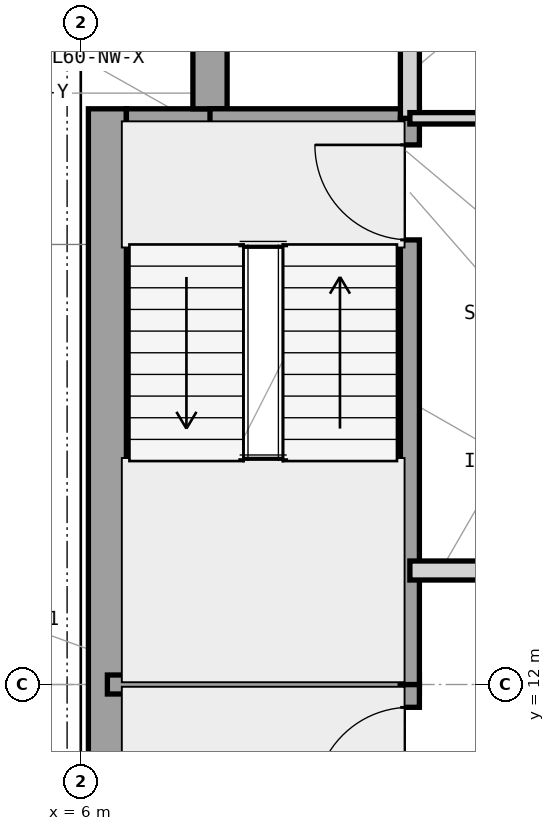
"""IFC4 building model, lengths in metres.
Left out: names, types, materials, properties, quantities, classifications, styles, units other than length and angle.
Written with IfcOpenShell. Run it as: python <this file> out.ifc"""

import sys

from ifc_helpers import new_model, si_unit, direction, frame, frame_2d, origin, place, context, subcontext, project, spatial, rectangle, extrude, element, fill, save


model = new_model("IFC4")
c1 = context("Model", 3, precision=1e-05, world=origin(), true_north=direction((0.0, 1.0)))
c2 = subcontext(c1, "Body", "Model", "MODEL_VIEW")
j1 = project(units=[si_unit("LENGTHUNIT", "METRE"), si_unit("PLANEANGLEUNIT", "RADIAN")], contexts=[c1])
p1 = place(None, origin())
s1 = spatial("IfcSite", under=j1, at=p1, CompositionType="ELEMENT")
p2 = place(p1, origin())
s2 = spatial("IfcBuilding", under=s1, at=p2, CompositionType="ELEMENT")
p3 = place(p2, frame((0.0, 0.0, 246.9)))
s3 = spatial("IfcBuildingStorey", under=s2, at=p3, CompositionType="ELEMENT", Elevation=246.9)
p4 = place(p3, frame((6.35, 4.425, 0.0), z_axis=(0.0, 0.0, 1.0), x_axis=(0.0, 1.0, 0.0)))
e1 = element("IfcWall", 1, at=p4, inside=s3, PredefinedType="SHEAR", context=c2, shape_type="SweptSolid", body=[
    extrude(rectangle(XDim=15.15, YDim=0.5, at=frame_2d((7.575, 0.0))), origin(), (0.0, 0.0, 1.0), 3.9),
])
p5 = place(p3, frame((6.6, 19.35, 0.0), z_axis=(0.0, 0.0, 1.0), x_axis=(1.0, 0.0, 0.0)))
e2 = element("IfcWall", 2, at=p5, inside=s3, PredefinedType="SHEAR", context=c2, shape_type="SweptSolid", body=[
    extrude(rectangle(XDim=1.325, YDim=0.45, at=frame_2d((0.663, 0.0))), origin(), (0.0, 0.0, 1.0), 3.9),
])
p6 = place(p3, frame((7.7, 19.575, 0.0), z_axis=(0.0, 0.0, 1.0), x_axis=(0.0, 1.0, 0.0)))
e3 = element("IfcWall", 3, at=p6, inside=s3, PredefinedType="SHEAR", context=c2, shape_type="SweptSolid", body=[
    extrude(rectangle(XDim=0.825, YDim=0.45, at=frame_2d((0.413, 0.0))), origin(), (0.0, 0.0, 1.0), 3.9),
])
p7 = place(p3, frame((6.35, 12.0, 0.0), z_axis=(0.0, 0.0, 1.0), x_axis=(1.0, 0.0, 0.0)))
e4 = element("IfcWall", 4, at=p7, inside=s3, PredefinedType="SHEAR", context=c2, shape_type="SweptSolid", body=[
    extrude(rectangle(XDim=4.105, YDim=0.25, at=frame_2d((2.052, 0.0))), origin(), (0.0, 0.0, 1.0), 3.9),
])
p8 = place(p3, frame((7.7, 19.45, 0.0), z_axis=(0.0, 0.0, 1.0), x_axis=(1.0, 0.0, 0.0)))
e5 = element("IfcWall", 5, at=p8, inside=s3, PredefinedType="SHEAR", context=c2, shape_type="SweptSolid", body=[
    extrude(rectangle(XDim=2.755, YDim=0.25, at=frame_2d((1.377, 0.0))), origin(), (0.0, 0.0, 1.0), 3.9),
])
p9 = place(p3, frame((10.33, 4.55, 0.0), z_axis=(0.0, 0.0, 1.0), x_axis=(0.0, 1.0, 0.0)))
e6 = element("IfcWall", 6, at=p9, inside=s3, PredefinedType="SHEAR", context=c2, shape_type="SweptSolid", body=[
    extrude(rectangle(XDim=7.45, YDim=0.25, at=frame_2d((3.725, 0.0))), origin(), (0.0, 0.0, 1.0), 3.9),
])
p10 = place(p9, frame((5.9, 0.0, 0.0)))
e7 = element("IfcOpeningElement", 7, at=p10, cuts=e6, PredefinedType="OPENING", context=c2, shape_type="SweptSolid", body=[
    extrude(rectangle(XDim=1.25, YDim=2.2, at=frame_2d((0.625, 1.1))), frame((0.0, 0.135, 0.0), z_axis=(0.0, -1.0, 0.0), x_axis=(1.0, 0.0, 0.0)), (0.0, 0.0, 1.0), 0.27),
])
p11 = place(p3, frame((10.33, 12.0, 0.0), z_axis=(0.0, 0.0, 1.0), x_axis=(0.0, 1.0, 0.0)))
e8 = element("IfcWall", 8, at=p11, inside=s3, PredefinedType="SHEAR", context=c2, shape_type="SweptSolid", body=[
    extrude(rectangle(XDim=7.45, YDim=0.25, at=frame_2d((3.725, 0.0))), origin(), (0.0, 0.0, 1.0), 3.9),
])
p12 = place(p11, frame((5.85, 0.0, 0.0)))
e9 = element("IfcOpeningElement", 9, at=p12, cuts=e8, PredefinedType="OPENING", context=c2, shape_type="SweptSolid", body=[
    extrude(rectangle(XDim=1.25, YDim=2.2, at=frame_2d((0.625, 1.1))), frame((0.0, 0.135, 0.0), z_axis=(0.0, -1.0, 0.0), x_axis=(1.0, 0.0, 0.0)), (0.0, 0.0, 1.0), 0.27),
])
p13 = place(p3, frame((10.33, 19.45, 0.0), z_axis=(0.0, 0.0, 1.0), x_axis=(0.0, 1.0, 0.0)))
e10 = element("IfcWall", 10, at=p13, inside=s3, PredefinedType="PARTITIONING", context=c2, shape_type="SweptSolid", body=[
    extrude(rectangle(XDim=1.2, YDim=0.25, at=frame_2d((0.6, 0.0))), origin(), (0.0, 0.0, 1.0), 3.69),
])
p14 = place(p3, frame((10.33, 13.5, 0.0), z_axis=(0.0, 0.0, 1.0), x_axis=(1.0, 0.0, 0.0)))
e11 = element("IfcWall", 11, at=p14, inside=s3, PredefinedType="PARTITIONING", context=c2, shape_type="SweptSolid", body=[
    extrude(rectangle(XDim=1.62, YDim=0.25, at=frame_2d((0.81, 0.0))), origin(), (0.0, 0.0, 1.0), 3.073),
])
p15 = place(p3, frame((10.33, 19.45, 0.0), z_axis=(0.0, 0.0, 1.0), x_axis=(1.0, 0.0, 0.0)))
e12 = element("IfcWall", 12, at=p15, inside=s3, PredefinedType="PARTITIONING", context=c2, shape_type="SweptSolid", body=[
    extrude(rectangle(XDim=3.82, YDim=0.15, at=frame_2d((1.91, 0.0))), origin(), (0.0, 0.0, 1.0), 3.69),
])
p16 = place(p15, frame((1.25, 0.0, 0.0)))
e13 = element("IfcOpeningElement", 13, at=p16, cuts=e12, PredefinedType="OPENING", context=c2, shape_type="SweptSolid", body=[
    extrude(rectangle(XDim=0.95, YDim=2.1, at=frame_2d((0.475, 1.05))), frame((0.0, 0.085, 0.0), z_axis=(0.0, -1.0, 0.0), x_axis=(1.0, 0.0, 0.0)), (0.0, 0.0, 1.0), 0.17),
])
p17 = place(p10, origin())
e14 = element("IfcDoor", 14, at=p17, inside=s3, OperationType="SINGLE_SWING_LEFT", PredefinedType="DOOR", context=c2, shape_type="SweptSolid", body=[
    extrude(rectangle(XDim=1.25, YDim=2.2, at=frame_2d((0.625, 1.1))), frame((0.0, 0.025, 0.0), z_axis=(0.0, -1.0, 0.0), x_axis=(1.0, 0.0, 0.0)), (0.0, 0.0, 1.0), 0.05),
])
fill(e7, e14)
p18 = place(p12, origin())
e15 = element("IfcDoor", 15, at=p18, inside=s3, OperationType="SINGLE_SWING_RIGHT", PredefinedType="DOOR", context=c2, shape_type="SweptSolid", body=[
    extrude(rectangle(XDim=1.25, YDim=2.2, at=frame_2d((0.625, 1.1))), frame((0.0, 0.025, 0.0), z_axis=(0.0, -1.0, 0.0), x_axis=(1.0, 0.0, 0.0)), (0.0, 0.0, 1.0), 0.05),
])
fill(e9, e15)
save(model, sys.argv[1])
